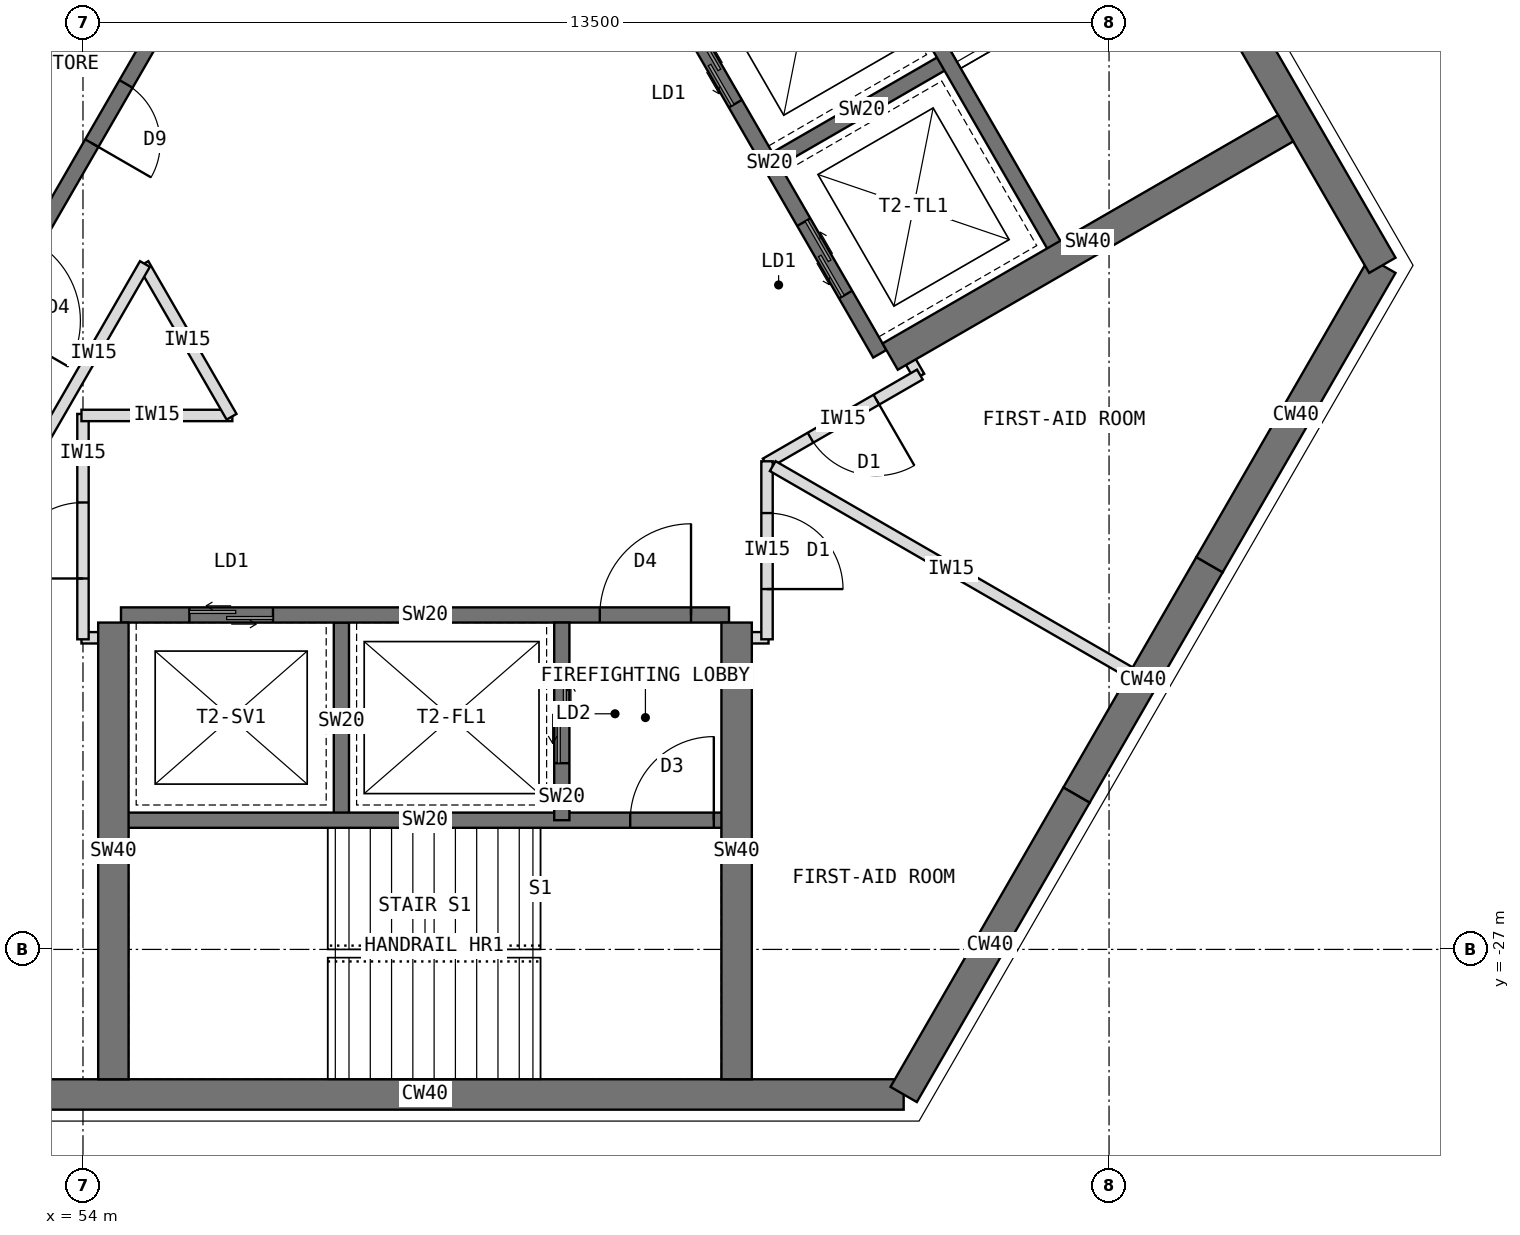
"""IFC4 building model, lengths in metres.
Left out: names, types, materials, properties, quantities, classifications, styles, units other than length and angle.
Written with IfcOpenShell. Run it as: python <this file> out.ifc"""

import sys

from ifc_helpers import new_model, si_unit, direction, frame, frame_2d, origin, place, context, subcontext, project, spatial, rectangle, extrude, element, fill, save


model = new_model("IFC4")
c1 = context("Model", 3, precision=1e-05, world=origin(), true_north=direction((0.0, 1.0)))
c2 = subcontext(c1, "Body", "Model", "MODEL_VIEW")
j1 = project(units=[si_unit("LENGTHUNIT", "METRE"), si_unit("PLANEANGLEUNIT", "RADIAN")], contexts=[c1])
p1 = place(None, origin())
s1 = spatial("IfcSite", under=j1, at=p1, CompositionType="ELEMENT")
p2 = place(p1, origin())
s2 = spatial("IfcBuilding", under=s1, at=p2, CompositionType="ELEMENT")
p3 = place(p2, frame((0.0, 0.0, 287.5)))
s3 = spatial("IfcBuildingStorey", under=s2, at=p3, CompositionType="ELEMENT", Elevation=287.5)
p4 = place(p3, frame((52.202, -28.908, 0.0), z_axis=(0.0, 0.0, 1.0), x_axis=(1.0, 0.0, 0.0)))
e1 = element("IfcWall", 1, at=p4, inside=s3, PredefinedType="SHEAR", context=c2, shape_type="SweptSolid", body=[
    extrude(rectangle(XDim=12.596, YDim=0.4, at=frame_2d((6.298, 0.0))), origin(), (0.0, 0.0, 1.0), 4.0),
])
p5 = place(p3, frame((64.798, -28.908, 0.0), z_axis=(0.0, 0.0, 1.0), x_axis=(0.499984222037, 0.866034513004, 0.0)))
e2 = element("IfcWall", 2, at=p5, inside=s3, PredefinedType="SHEAR", context=c2, shape_type="SweptSolid", body=[
    extrude(rectangle(XDim=4.548, YDim=0.4, at=frame_2d((2.274, 0.0))), origin(), (0.0, 0.0, 1.0), 4.0),
])
p6 = place(p3, frame((67.072, -24.97, 0.0), z_axis=(0.0, 0.0, 1.0), x_axis=(0.500010275428, 0.866019471182, 0.0)))
e3 = element("IfcWall", 3, at=p6, inside=s3, PredefinedType="SHEAR", context=c2, shape_type="SweptSolid", body=[
    extrude(rectangle(XDim=3.5, YDim=0.4, at=frame_2d((1.75, 0.0))), origin(), (0.0, 0.0, 1.0), 4.0),
])
p7 = place(p3, frame((68.822, -21.939, 0.0), z_axis=(0.0, 0.0, 1.0), x_axis=(0.500024481964, 0.866011268655, 0.0)))
e4 = element("IfcWall", 4, at=p7, inside=s3, PredefinedType="SHEAR", context=c2, shape_type="SweptSolid", body=[
    extrude(rectangle(XDim=4.548, YDim=0.4, at=frame_2d((2.274, 0.0))), origin(), (0.0, 0.0, 1.0), 4.0),
])
p8 = place(p3, frame((71.096, -18.0, 0.0), z_axis=(0.0, 0.0, 1.0), x_axis=(-0.500005998175, 0.866021940709, 0.0)))
e5 = element("IfcWall", 5, at=p8, inside=s3, PredefinedType="SHEAR", context=c2, shape_type="SweptSolid", body=[
    extrude(rectangle(XDim=12.596, YDim=0.4, at=frame_2d((6.298, 0.0))), origin(), (0.0, 0.0, 1.0), 4.0),
])
p9 = place(p3, frame((56.516, -12.236, 0.0), z_axis=(0.0, 0.0, 1.0), x_axis=(-0.49999894854, -0.866026010844, 0.0)))
e6 = element("IfcWall", 6, at=p9, inside=s3, PredefinedType="SHEAR", context=c2, shape_type="SweptSolid", body=[
    extrude(rectangle(XDim=8.0, YDim=0.2, at=frame_2d((4.0, 0.0))), origin(), (0.0, 0.0, 1.0), 4.0),
])
p10 = place(p9, frame((6.3, 0.0, 0.0)))
e7 = element("IfcOpeningElement", 7, at=p10, cuts=e6, PredefinedType="OPENING", context=c2, shape_type="SweptSolid", body=[
    extrude(rectangle(XDim=1.2, YDim=2.1, at=frame_2d((0.6, 1.05))), frame((0.0, 0.11, 0.0), z_axis=(0.0, -1.0, 0.0), x_axis=(1.0, 0.0, 0.0)), (0.0, 0.0, 1.0), 0.22),
])
p11 = place(p9, frame((1.0, 0.0, 0.0)))
e8 = element("IfcOpeningElement", 8, at=p11, cuts=e6, PredefinedType="OPENING", context=c2, shape_type="SweptSolid", body=[
    extrude(rectangle(XDim=0.9, YDim=2.1, at=frame_2d((0.45, 1.05))), frame((0.0, 0.11, 0.0), z_axis=(0.0, -1.0, 0.0), x_axis=(1.0, 0.0, 0.0)), (0.0, 0.0, 1.0), 0.22),
])
p12 = place(p9, frame((3.9, 0.0, 0.0)))
e9 = element("IfcOpeningElement", 9, at=p12, cuts=e6, PredefinedType="OPENING", context=c2, shape_type="SweptSolid", body=[
    extrude(rectangle(XDim=0.9, YDim=2.1, at=frame_2d((0.45, 1.05))), frame((0.0, 0.11, 0.0), z_axis=(0.0, -1.0, 0.0), x_axis=(1.0, 0.0, 0.0)), (0.0, 0.0, 1.0), 0.22),
])
p13 = place(p3, frame((54.178, -10.886, 0.0), z_axis=(0.0, 0.0, 1.0), x_axis=(-0.49999894854, -0.866026010844, 0.0)))
e10 = element("IfcWall", 10, at=p13, inside=s3, PredefinedType="SHEAR", context=c2, shape_type="SweptSolid", body=[
    extrude(rectangle(XDim=8.0, YDim=0.2, at=frame_2d((4.0, 0.0))), origin(), (0.0, 0.0, 1.0), 4.0),
])
p14 = place(p13, frame((6.8, 0.0, 0.0)))
e11 = element("IfcOpeningElement", 11, at=p14, cuts=e10, PredefinedType="OPENING", context=c2, shape_type="SweptSolid", body=[
    extrude(rectangle(XDim=0.9, YDim=2.1, at=frame_2d((0.45, 1.05))), frame((0.0, 0.11, 0.0), z_axis=(0.0, -1.0, 0.0), x_axis=(1.0, 0.0, 0.0)), (0.0, 0.0, 1.0), 0.22),
])
p15 = place(p3, frame((54.5, -22.6, 0.0), z_axis=(0.0, 0.0, 1.0), x_axis=(1.0, 0.0, 0.0)))
e12 = element("IfcWall", 12, at=p15, inside=s3, PredefinedType="SHEAR", context=c2, shape_type="SweptSolid", body=[
    extrude(rectangle(XDim=8.0, YDim=0.2, at=frame_2d((4.0, 0.0))), origin(), (0.0, 0.0, 1.0), 4.0),
])
p16 = place(p15, frame((6.3, 0.0, 0.0)))
e13 = element("IfcOpeningElement", 13, at=p16, cuts=e12, PredefinedType="OPENING", context=c2, shape_type="SweptSolid", body=[
    extrude(rectangle(XDim=1.2, YDim=2.1, at=frame_2d((0.6, 1.05))), frame((0.0, 0.11, 0.0), z_axis=(0.0, -1.0, 0.0), x_axis=(1.0, 0.0, 0.0)), (0.0, 0.0, 1.0), 0.22),
])
p17 = place(p15, frame((0.9, 0.0, 0.0)))
e14 = element("IfcOpeningElement", 14, at=p17, cuts=e12, PredefinedType="OPENING", context=c2, shape_type="SweptSolid", body=[
    extrude(rectangle(XDim=1.1, YDim=2.2, at=frame_2d((0.55, 1.1))), frame((0.0, 0.11, 0.0), z_axis=(0.0, -1.0, 0.0), x_axis=(1.0, 0.0, 0.0)), (0.0, 0.0, 1.0), 0.22),
])
p18 = place(p3, frame((57.4, -22.7, 0.0), z_axis=(0.0, 0.0, 1.0), x_axis=(0.0, -1.0, 0.0)))
e15 = element("IfcWall", 15, at=p18, inside=s3, PredefinedType="SHEAR", context=c2, shape_type="SweptSolid", body=[
    extrude(rectangle(XDim=2.6, YDim=0.2, at=frame_2d((1.3, 0.0))), origin(), (0.0, 0.0, 1.0), 4.0),
])
p19 = place(p3, frame((60.3, -22.7, 0.0), z_axis=(0.0, 0.0, 1.0), x_axis=(0.0, -1.0, 0.0)))
e16 = element("IfcWall", 16, at=p19, inside=s3, PredefinedType="SHEAR", context=c2, shape_type="SweptSolid", body=[
    extrude(rectangle(XDim=2.6, YDim=0.2, at=frame_2d((1.3, 0.0))), origin(), (0.0, 0.0, 1.0), 4.0),
])
p20 = place(p19, frame((0.55, 0.0, 0.0)))
e17 = element("IfcOpeningElement", 17, at=p20, cuts=e16, PredefinedType="OPENING", context=c2, shape_type="SweptSolid", body=[
    extrude(rectangle(XDim=1.3, YDim=2.2, at=frame_2d((0.65, 1.1))), frame((0.0, 0.11, 0.0), z_axis=(0.0, -1.0, 0.0), x_axis=(1.0, 0.0, 0.0)), (0.0, 0.0, 1.0), 0.22),
])
p21 = place(p3, frame((54.5, -25.3, 0.0), z_axis=(0.0, 0.0, 1.0), x_axis=(1.0, 0.0, 0.0)))
e18 = element("IfcWall", 18, at=p21, inside=s3, PredefinedType="SHEAR", context=c2, shape_type="SweptSolid", body=[
    extrude(rectangle(XDim=8.0, YDim=0.2, at=frame_2d((4.0, 0.0))), origin(), (0.0, 0.0, 1.0), 4.0),
])
p22 = place(p21, frame((6.7, 0.0, 0.0)))
e19 = element("IfcOpeningElement", 19, at=p22, cuts=e18, PredefinedType="OPENING", context=c2, shape_type="SweptSolid", body=[
    extrude(rectangle(XDim=1.1, YDim=2.1, at=frame_2d((0.55, 1.05))), frame((0.0, 0.11, 0.0), z_axis=(0.0, -1.0, 0.0), x_axis=(1.0, 0.0, 0.0)), (0.0, 0.0, 1.0), 0.22),
])
for number, where, z_axis, x_axis in (
    (20, (62.6, -22.7, 0.0), (0.0, 0.0, 1.0), (0.0, -1.0, 0.0)),
    (21, (54.4, -22.7, 0.0), (0.0, 0.0, 1.0), (0.0, -1.0, 0.0)),
):
    element("IfcWall", number, at=place(p3, frame(where, z_axis=z_axis, x_axis=x_axis)), inside=s3, PredefinedType="SHEAR", context=c2, shape_type="SweptSolid", body=[
        extrude(rectangle(XDim=6.008, YDim=0.4, at=frame_2d((3.004, 0.0))), origin(), (0.0, 0.0, 1.0), 4.0),
    ])
p23 = place(p3, frame((64.484, -19.164, 0.0), z_axis=(0.0, 0.0, 1.0), x_axis=(-0.49999894854, 0.866026010844, 0.0)))
e22 = element("IfcWall", 22, at=p23, inside=s3, PredefinedType="SHEAR", context=c2, shape_type="SweptSolid", body=[
    extrude(rectangle(XDim=8.0, YDim=0.2, at=frame_2d((4.0, 0.0))), origin(), (0.0, 0.0, 1.0), 4.0),
])
p24 = place(p23, frame((6.3, 0.0, 0.0)))
e23 = element("IfcOpeningElement", 23, at=p24, cuts=e22, PredefinedType="OPENING", context=c2, shape_type="SweptSolid", body=[
    extrude(rectangle(XDim=1.2, YDim=2.1, at=frame_2d((0.6, 1.05))), frame((0.0, 0.11, 0.0), z_axis=(0.0, -1.0, 0.0), x_axis=(1.0, 0.0, 0.0)), (0.0, 0.0, 1.0), 0.22),
])
p25 = place(p23, frame((0.9, 0.0, 0.0)))
e24 = element("IfcOpeningElement", 24, at=p25, cuts=e22, PredefinedType="OPENING", context=c2, shape_type="SweptSolid", body=[
    extrude(rectangle(XDim=1.1, YDim=2.2, at=frame_2d((0.55, 1.1))), frame((0.0, 0.11, 0.0), z_axis=(0.0, -1.0, 0.0), x_axis=(1.0, 0.0, 0.0)), (0.0, 0.0, 1.0), 0.22),
])
p26 = place(p23, frame((3.8, 0.0, 0.0)))
e25 = element("IfcOpeningElement", 25, at=p26, cuts=e22, PredefinedType="OPENING", context=c2, shape_type="SweptSolid", body=[
    extrude(rectangle(XDim=1.1, YDim=2.2, at=frame_2d((0.55, 1.1))), frame((0.0, 0.11, 0.0), z_axis=(0.0, -1.0, 0.0), x_axis=(1.0, 0.0, 0.0)), (0.0, 0.0, 1.0), 0.22),
])
p27 = place(p3, frame((63.12, -16.603, 0.0), z_axis=(0.0, 0.0, 1.0), x_axis=(0.866062058628, 0.499936506574, 0.0)))
e26 = element("IfcWall", 26, at=p27, inside=s3, PredefinedType="SHEAR", context=c2, shape_type="SweptSolid", body=[
    extrude(rectangle(XDim=2.6, YDim=0.2, at=frame_2d((1.3, 0.0))), origin(), (0.0, 0.0, 1.0), 4.0),
])
p28 = place(p3, frame((66.822, -17.814, 0.0), z_axis=(0.0, 0.0, 1.0), x_axis=(-0.49999894854, 0.866026010844, 0.0)))
e27 = element("IfcWall", 27, at=p28, inside=s3, PredefinedType="SHEAR", context=c2, shape_type="SweptSolid", body=[
    extrude(rectangle(XDim=8.0, YDim=0.2, at=frame_2d((4.0, 0.0))), origin(), (0.0, 0.0, 1.0), 4.0),
])
p29 = place(p28, frame((6.7, 0.0, 0.0)))
e28 = element("IfcOpeningElement", 28, at=p29, cuts=e27, PredefinedType="OPENING", context=c2, shape_type="SweptSolid", body=[
    extrude(rectangle(XDim=1.1, YDim=2.1, at=frame_2d((0.55, 1.05))), frame((0.0, 0.11, 0.0), z_axis=(0.0, -1.0, 0.0), x_axis=(1.0, 0.0, 0.0)), (0.0, 0.0, 1.0), 0.22),
])
p30 = place(p3, frame((64.62, -19.201, 0.0), z_axis=(0.0, 0.0, 1.0), x_axis=(0.866026570101, 0.499997979876, 0.0)))
e29 = element("IfcWall", 29, at=p30, inside=s3, PredefinedType="SHEAR", context=c2, shape_type="SweptSolid", body=[
    extrude(rectangle(XDim=6.008, YDim=0.4, at=frame_2d((3.004, 0.0))), origin(), (0.0, 0.0, 1.0), 4.0),
])
for number, where, z_axis, x_axis in (
    (30, (63.02, -22.9, 0.0), (0.0, 0.0, 1.0), (-1.0, 0.0, 0.0)),
    (31, (54.41, -22.9, 0.0), (0.0, 0.0, 1.0), (-1.0, 0.0, 0.0)),
):
    element("IfcWall", number, at=place(p3, frame(where, z_axis=z_axis, x_axis=x_axis)), inside=s3, PredefinedType="PARTITIONING", context=c2, shape_type="SweptSolid", body=[
        extrude(rectangle(XDim=0.43, YDim=0.15, at=frame_2d((0.215, 0.0))), origin(), (0.0, 0.0, 1.0), 3.7),
    ])
p31 = place(p3, frame((54.0, -22.92, 0.0), z_axis=(0.0, 0.0, 1.0), x_axis=(0.0, 1.0, 0.0)))
e32 = element("IfcWall", 32, at=p31, inside=s3, PredefinedType="PARTITIONING", context=c2, shape_type="SweptSolid", body=[
    extrude(rectangle(XDim=2.965, YDim=0.15, at=frame_2d((1.482, 0.0))), origin(), (0.0, 0.0, 1.0), 3.7),
])
p32 = place(p31, frame((0.8, 0.0, 0.0)))
e33 = element("IfcOpeningElement", 33, at=p32, cuts=e32, PredefinedType="OPENING", context=c2, shape_type="SweptSolid", body=[
    extrude(rectangle(XDim=1.0, YDim=2.1, at=frame_2d((0.5, 1.05))), frame((0.0, 0.085, 0.0), z_axis=(0.0, -1.0, 0.0), x_axis=(1.0, 0.0, 0.0)), (0.0, 0.0, 1.0), 0.17),
])
p33 = place(p3, frame((53.98, -19.975, 0.0), z_axis=(0.0, 0.0, 1.0), x_axis=(1.0, 0.0, 0.0)))
e34 = element("IfcWall", 34, at=p33, inside=s3, PredefinedType="PARTITIONING", context=c2, shape_type="SweptSolid", body=[
    extrude(rectangle(XDim=1.985, YDim=0.15, at=frame_2d((0.993, 0.0))), origin(), (0.0, 0.0, 1.0), 3.7),
])
p34 = place(p3, frame((55.955, -19.992, 0.0), z_axis=(0.0, 0.0, 1.0), x_axis=(-0.499941024108, 0.866059450854, 0.0)))
e35 = element("IfcWall", 35, at=p34, inside=s3, PredefinedType="PARTITIONING", context=c2, shape_type="SweptSolid", body=[
    extrude(rectangle(XDim=2.321, YDim=0.15, at=frame_2d((1.16, 0.0))), origin(), (0.0, 0.0, 1.0), 3.7),
])
p35 = place(p3, frame((54.815, -17.983, 0.0), z_axis=(0.0, 0.0, 1.0), x_axis=(-0.499981473571, -0.866036099759, 0.0)))
e36 = element("IfcWall", 36, at=p35, inside=s3, PredefinedType="PARTITIONING", context=c2, shape_type="SweptSolid", body=[
    extrude(rectangle(XDim=2.692, YDim=0.15, at=frame_2d((1.346, 0.0))), origin(), (0.0, 0.0, 1.0), 3.7),
])
p36 = place(p3, frame((64.789, -19.092, 0.0), z_axis=(0.0, 0.0, 1.0), x_axis=(0.499804398801, -0.866138304741, 0.0)))
e37 = element("IfcWall", 37, at=p36, inside=s3, PredefinedType="PARTITIONING", context=c2, shape_type="SweptSolid", body=[
    extrude(rectangle(XDim=0.43, YDim=0.15, at=frame_2d((0.215, 0.0))), origin(), (0.0, 0.0, 1.0), 3.7),
])
p37 = place(p3, frame((65.011, -19.437, 0.0), z_axis=(0.0, 0.0, 1.0), x_axis=(-0.865982457891, -0.500074377092, 0.0)))
e38 = element("IfcWall", 38, at=p37, inside=s3, PredefinedType="PARTITIONING", context=c2, shape_type="SweptSolid", body=[
    extrude(rectangle(XDim=2.342, YDim=0.15, at=frame_2d((1.171, 0.0))), origin(), (0.0, 0.0, 1.0), 3.7),
])
p38 = place(p37, frame((0.661, 0.0, 0.0)))
e39 = element("IfcOpeningElement", 39, at=p38, cuts=e38, PredefinedType="OPENING", context=c2, shape_type="SweptSolid", body=[
    extrude(rectangle(XDim=1.0, YDim=2.1, at=frame_2d((0.5, 1.05))), frame((0.0, 0.085, 0.0), z_axis=(0.0, -1.0, 0.0), x_axis=(1.0, 0.0, 0.0)), (0.0, 0.0, 1.0), 0.17),
])
p39 = place(p3, frame((63.0, -20.578, 0.0), z_axis=(0.0, 0.0, 1.0), x_axis=(0.0, -1.0, 0.0)))
e40 = element("IfcWall", 40, at=p39, inside=s3, PredefinedType="PARTITIONING", context=c2, shape_type="SweptSolid", body=[
    extrude(rectangle(XDim=2.342, YDim=0.15, at=frame_2d((1.171, 0.0))), origin(), (0.0, 0.0, 1.0), 3.7),
])
p40 = place(p39, frame((0.681, 0.0, 0.0)))
e41 = element("IfcOpeningElement", 41, at=p40, cuts=e40, PredefinedType="OPENING", context=c2, shape_type="SweptSolid", body=[
    extrude(rectangle(XDim=1.0, YDim=2.1, at=frame_2d((0.5, 1.05))), frame((0.0, 0.085, 0.0), z_axis=(0.0, -1.0, 0.0), x_axis=(1.0, 0.0, 0.0)), (0.0, 0.0, 1.0), 0.17),
])
p41 = place(p3, frame((63.075, -20.641, 0.0), z_axis=(0.0, 0.0, 1.0), x_axis=(0.866019232626, -0.500010688608, 0.0)))
e42 = element("IfcWall", 42, at=p41, inside=s3, PredefinedType="PARTITIONING", context=c2, shape_type="SweptSolid", body=[
    extrude(rectangle(XDim=5.426, YDim=0.15, at=frame_2d((2.713, 0.0))), origin(), (0.0, 0.0, 1.0), 3.7),
])
p42 = place(p16, origin())
e43 = element("IfcDoor", 43, at=p42, inside=s3, OperationType="SINGLE_SWING_RIGHT", PredefinedType="DOOR", context=c2, shape_type="SweptSolid", body=[
    extrude(rectangle(XDim=1.2, YDim=2.1, at=frame_2d((0.6, 1.05))), frame((0.0, 0.025, 0.0), z_axis=(0.0, -1.0, 0.0), x_axis=(1.0, 0.0, 0.0)), (0.0, 0.0, 1.0), 0.05),
])
fill(e13, e43)
p43 = place(p20, origin())
e44 = element("IfcDoor", 44, at=p43, inside=s3, OperationType="DOUBLE_DOOR_SLIDING", PredefinedType="DOOR", context=c2, shape_type="SweptSolid", body=[
    extrude(rectangle(XDim=1.3, YDim=2.2, at=frame_2d((0.65, 1.1))), frame((0.0, 0.025, 0.0), z_axis=(0.0, -1.0, 0.0), x_axis=(1.0, 0.0, 0.0)), (0.0, 0.0, 1.0), 0.05),
])
fill(e17, e44)
p44 = place(p17, origin())
e45 = element("IfcDoor", 45, at=p44, inside=s3, OperationType="DOUBLE_DOOR_SLIDING", PredefinedType="DOOR", context=c2, shape_type="SweptSolid", body=[
    extrude(rectangle(XDim=1.1, YDim=2.2, at=frame_2d((0.55, 1.1))), frame((0.0, 0.025, 0.0), z_axis=(0.0, -1.0, 0.0), x_axis=(1.0, 0.0, 0.0)), (0.0, 0.0, 1.0), 0.05),
])
fill(e14, e45)
p45 = place(p22, origin())
e46 = element("IfcDoor", 46, at=p45, inside=s3, OperationType="SINGLE_SWING_RIGHT", PredefinedType="DOOR", context=c2, shape_type="SweptSolid", body=[
    extrude(rectangle(XDim=1.1, YDim=2.1, at=frame_2d((0.55, 1.05))), frame((0.0, 0.025, 0.0), z_axis=(0.0, -1.0, 0.0), x_axis=(1.0, 0.0, 0.0)), (0.0, 0.0, 1.0), 0.05),
])
fill(e19, e46)
p46 = place(p25, origin())
e47 = element("IfcDoor", 47, at=p46, inside=s3, OperationType="DOUBLE_DOOR_SLIDING", PredefinedType="DOOR", context=c2, shape_type="SweptSolid", body=[
    extrude(rectangle(XDim=1.1, YDim=2.2, at=frame_2d((0.55, 1.1))), frame((0.0, 0.025, 0.0), z_axis=(0.0, -1.0, 0.0), x_axis=(1.0, 0.0, 0.0)), (0.0, 0.0, 1.0), 0.05),
])
fill(e24, e47)
p47 = place(p26, origin())
e48 = element("IfcDoor", 48, at=p47, inside=s3, OperationType="DOUBLE_DOOR_SLIDING", PredefinedType="DOOR", context=c2, shape_type="SweptSolid", body=[
    extrude(rectangle(XDim=1.1, YDim=2.2, at=frame_2d((0.55, 1.1))), frame((0.0, 0.025, 0.0), z_axis=(0.0, -1.0, 0.0), x_axis=(1.0, 0.0, 0.0)), (0.0, 0.0, 1.0), 0.05),
])
fill(e25, e48)
p48 = place(p32, origin())
e49 = element("IfcDoor", 49, at=p48, inside=s3, OperationType="SINGLE_SWING_LEFT", PredefinedType="DOOR", context=c2, shape_type="SweptSolid", body=[
    extrude(rectangle(XDim=1.0, YDim=2.1, at=frame_2d((0.5, 1.05))), frame((0.0, 0.025, 0.0), z_axis=(0.0, -1.0, 0.0), x_axis=(1.0, 0.0, 0.0)), (0.0, 0.0, 1.0), 0.05),
])
fill(e33, e49)
p49 = place(p40, origin())
e50 = element("IfcDoor", 50, at=p49, inside=s3, OperationType="SINGLE_SWING_RIGHT", PredefinedType="DOOR", context=c2, shape_type="SweptSolid", body=[
    extrude(rectangle(XDim=1.0, YDim=2.1, at=frame_2d((0.5, 1.05))), frame((0.0, 0.025, 0.0), z_axis=(0.0, -1.0, 0.0), x_axis=(1.0, 0.0, 0.0)), (0.0, 0.0, 1.0), 0.05),
])
fill(e41, e50)
p50 = place(p38, origin())
e51 = element("IfcDoor", 51, at=p50, inside=s3, OperationType="SINGLE_SWING_LEFT", PredefinedType="DOOR", context=c2, shape_type="SweptSolid", body=[
    extrude(rectangle(XDim=1.0, YDim=2.1, at=frame_2d((0.5, 1.05))), frame((0.0, 0.025, 0.0), z_axis=(0.0, -1.0, 0.0), x_axis=(1.0, 0.0, 0.0)), (0.0, 0.0, 1.0), 0.05),
])
fill(e39, e51)
p51 = place(p12, origin())
e52 = element("IfcDoor", 52, at=p51, inside=s3, OperationType="SINGLE_SWING_RIGHT", PredefinedType="DOOR", context=c2, shape_type="SweptSolid", body=[
    extrude(rectangle(XDim=0.9, YDim=2.1, at=frame_2d((0.45, 1.05))), frame((0.0, 0.025, 0.0), z_axis=(0.0, -1.0, 0.0), x_axis=(1.0, 0.0, 0.0)), (0.0, 0.0, 1.0), 0.05),
])
fill(e9, e52)
save(model, sys.argv[1])
